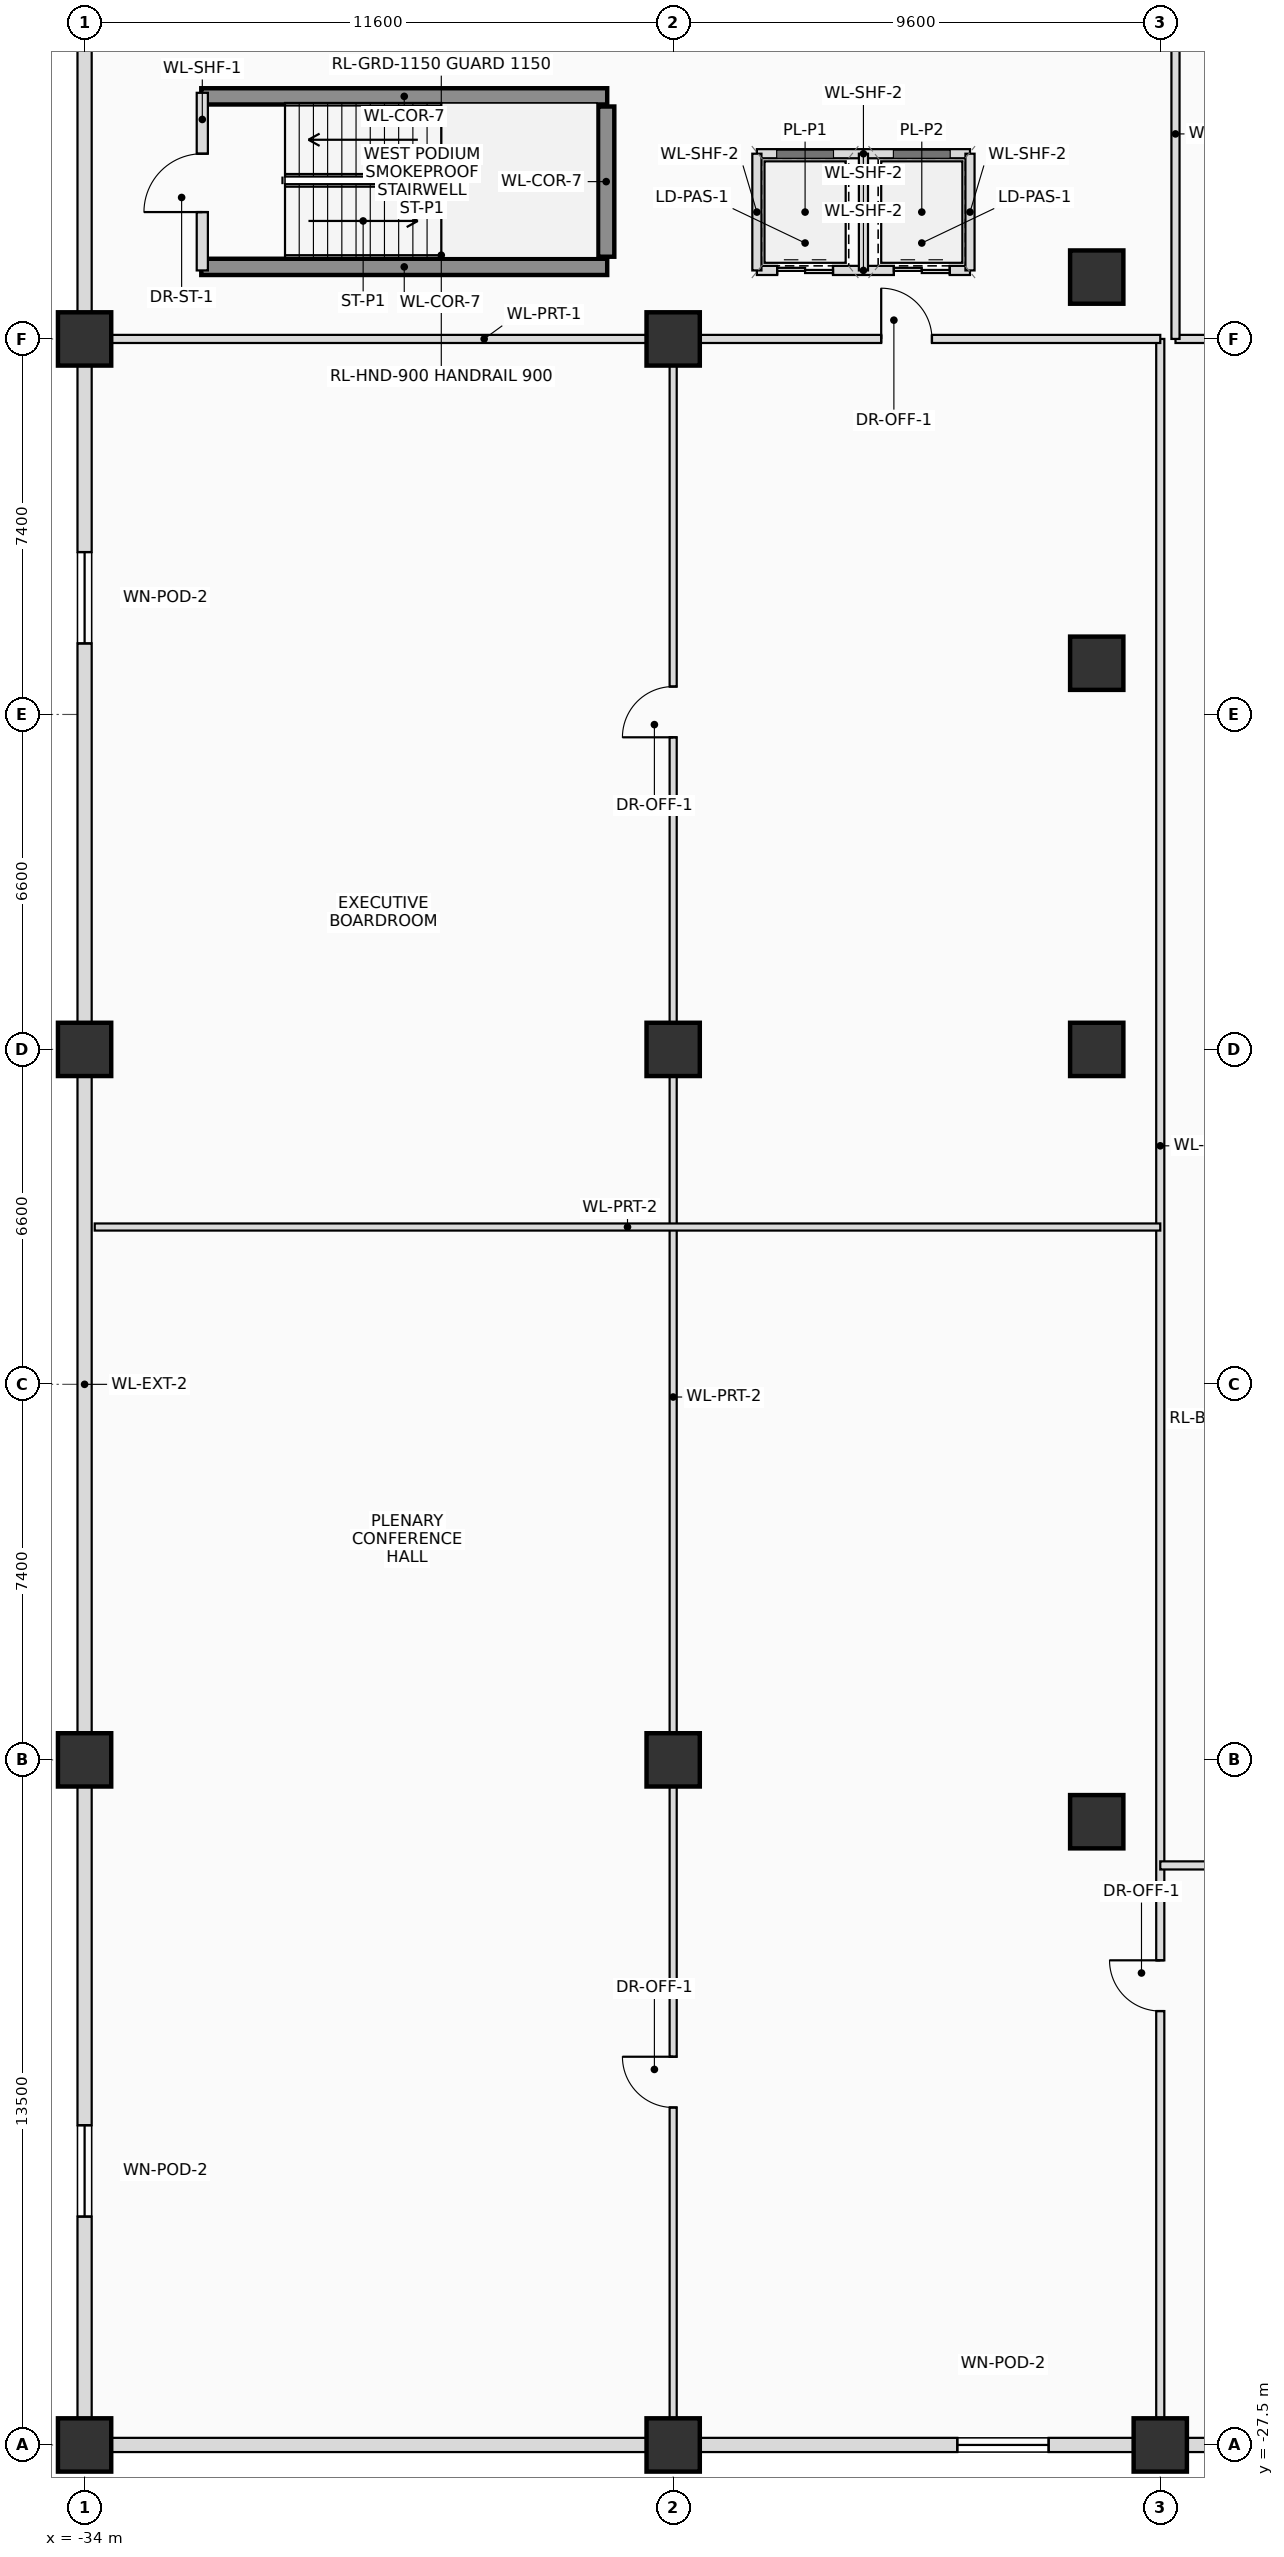
"""IFC4 building model, lengths in metres.
Left out: names, types, materials, properties, quantities, classifications, styles, units other than length and angle.
Written with IfcOpenShell. Run it as: python <this file> out.ifc"""

import sys

from ifc_helpers import new_model, si_unit, direction, frame, frame_2d, origin, origin_2d, place, context, subcontext, project, spatial, rectangle, extrude, source, transform, mapped, element, fill, save


model = new_model("IFC4")
c1 = context("Model", 3, precision=1e-05, world=origin(), true_north=direction((0.0, 1.0)))
c2 = subcontext(c1, "Body", "Model", "MODEL_VIEW")
j1 = project(units=[si_unit("LENGTHUNIT", "METRE"), si_unit("PLANEANGLEUNIT", "RADIAN")], contexts=[c1])
p1 = place(None, origin())
s1 = spatial("IfcSite", under=j1, at=p1, CompositionType="ELEMENT")
p2 = place(p1, origin())
s2 = spatial("IfcBuilding", under=s1, at=p2, CompositionType="ELEMENT")
p3 = place(p2, frame((0.0, 0.0, 12.3)))
s3 = spatial("IfcBuildingStorey", under=s2, at=p3, CompositionType="ELEMENT", Elevation=12.3)
for number, where, z_axis, x_axis in (
    (1, (-31.7, 18.78, 0.0), (0.0, 0.0, 1.0), (1.0, 0.0, 0.0)),
    (2, (-31.7, 15.42, 0.0), (0.0, 0.0, 1.0), (1.0, 0.0, 0.0)),
):
    element("IfcWall", number, at=place(p3, frame(where, z_axis=z_axis, x_axis=x_axis)), inside=s3, PredefinedType="SHEAR", context=c2, shape_type="SweptSolid", body=[
        extrude(rectangle(XDim=8.0, YDim=0.32, at=frame_2d((4.0, 0.0))), origin(), (0.0, 0.0, 1.0), 3.9),
    ])
p4 = place(p3, frame((-23.72, 15.62, 0.0), z_axis=(0.0, 0.0, 1.0), x_axis=(0.0, 1.0, 0.0)))
e3 = element("IfcWall", 3, at=p4, inside=s3, PredefinedType="SHEAR", context=c2, shape_type="SweptSolid", body=[
    extrude(rectangle(XDim=2.96, YDim=0.32, at=frame_2d((1.48, 0.0))), origin(), (0.0, 0.0, 1.0), 3.9),
])
m1 = source(origin(), c2, "Body", "SweptSolid", [
    extrude(rectangle(XDim=1.05, YDim=1.05, at=origin_2d()), origin(), (0.0, 0.0, 1.0), 3.9),
])
for number, where, z_axis, x_axis in (
    (4, (-34.0, -27.5, 0.0), (0.0, 0.0, 1.0), (1.0, 0.0, 0.0)),
    (5, (-22.4, -27.5, 0.0), (0.0, 0.0, 1.0), (1.0, 0.0, 0.0)),
    (6, (-12.8, -27.5, 0.0), (0.0, 0.0, 1.0), (1.0, 0.0, 0.0)),
    (7, (-34.0, -14.0, 0.0), (0.0, 0.0, 1.0), (1.0, 0.0, 0.0)),
    (8, (-22.4, -14.0, 0.0), (0.0, 0.0, 1.0), (1.0, 0.0, 0.0)),
    (9, (-34.0, 0.0, 0.0), (0.0, 0.0, 1.0), (1.0, 0.0, 0.0)),
    (10, (-22.4, 0.0, 0.0), (0.0, 0.0, 1.0), (1.0, 0.0, 0.0)),
    (11, (-34.0, 14.0, 0.0), (0.0, 0.0, 1.0), (1.0, 0.0, 0.0)),
    (12, (-22.4, 14.0, 0.0), (0.0, 0.0, 1.0), (1.0, 0.0, 0.0)),
    (13, (-14.052, 15.219, 0.0), (0.0, 0.0, 1.0), (1.0, 0.0, 0.0)),
    (14, (-14.052, 7.61, 0.0), (0.0, 0.0, 1.0), (1.0, 0.0, 0.0)),
    (15, (-14.052, 0.0, 0.0), (0.0, 0.0, 1.0), (1.0, 0.0, 0.0)),
    (16, (-14.052, -15.219, 0.0), (0.0, 0.0, 1.0), (1.0, 0.0, 0.0)),
):
    element("IfcColumn", number, at=place(p3, frame(where, z_axis=z_axis, x_axis=x_axis)), inside=s3, PredefinedType="COLUMN", context=c2, shape_type="MappedRepresentation", body=[
        mapped(m1, transform((0.0, 0.0, 0.0), scale=1.0)),
    ])
p5 = place(p3, frame((34.0, -27.5, 0.0), z_axis=(0.0, 0.0, 1.0), x_axis=(-1.0, 0.0, 0.0)))
e17 = element("IfcWall", 17, at=p5, inside=s3, PredefinedType="SOLIDWALL", context=c2, shape_type="SweptSolid", body=[
    extrude(rectangle(XDim=68.0, YDim=0.28, at=frame_2d((34.0, 0.0))), origin(), (0.0, 0.0, 1.0), 2.65),
])
p6 = place(p5, frame((16.0, 0.0, 0.65)))
e18 = element("IfcOpeningElement", 18, at=p6, cuts=e17, PredefinedType="OPENING", context=c2, shape_type="SweptSolid", body=[
    extrude(rectangle(XDim=1.8, YDim=1.8, at=frame_2d((0.9, 0.9))), frame((0.0, 0.15, 0.0), z_axis=(0.0, -1.0, 0.0), x_axis=(1.0, 0.0, 0.0)), (0.0, 0.0, 1.0), 0.3),
])
p7 = place(p5, frame((49.0, 0.0, 0.65)))
e19 = element("IfcOpeningElement", 19, at=p7, cuts=e17, PredefinedType="OPENING", context=c2, shape_type="SweptSolid", body=[
    extrude(rectangle(XDim=1.8, YDim=1.8, at=frame_2d((0.9, 0.9))), frame((0.0, 0.15, 0.0), z_axis=(0.0, -1.0, 0.0), x_axis=(1.0, 0.0, 0.0)), (0.0, 0.0, 1.0), 0.3),
])
p8 = place(p3, frame((-34.0, -27.5, 0.0), z_axis=(0.0, 0.0, 1.0), x_axis=(0.0, 1.0, 0.0)))
e20 = element("IfcWall", 20, at=p8, inside=s3, PredefinedType="SOLIDWALL", context=c2, shape_type="SweptSolid", body=[
    extrude(rectangle(XDim=57.0, YDim=0.28, at=frame_2d((28.5, 0.0))), origin(), (0.0, 0.0, 1.0), 2.65),
])
p9 = place(p8, frame((4.5, 0.0, 0.65)))
e21 = element("IfcOpeningElement", 21, at=p9, cuts=e20, PredefinedType="OPENING", context=c2, shape_type="SweptSolid", body=[
    extrude(rectangle(XDim=1.8, YDim=1.8, at=frame_2d((0.9, 0.9))), frame((0.0, 0.15, 0.0), z_axis=(0.0, -1.0, 0.0), x_axis=(1.0, 0.0, 0.0)), (0.0, 0.0, 1.0), 0.3),
])
p10 = place(p8, frame((35.5, 0.0, 0.65)))
e22 = element("IfcOpeningElement", 22, at=p10, cuts=e20, PredefinedType="OPENING", context=c2, shape_type="SweptSolid", body=[
    extrude(rectangle(XDim=1.8, YDim=1.8, at=frame_2d((0.9, 0.9))), frame((0.0, 0.15, 0.0), z_axis=(0.0, -1.0, 0.0), x_axis=(1.0, 0.0, 0.0)), (0.0, 0.0, 1.0), 0.3),
])
p11 = place(p3, frame((-31.68, 15.35, 0.0), z_axis=(0.0, 0.0, 1.0), x_axis=(0.0, 1.0, 0.0)))
e23 = element("IfcWall", 23, at=p11, inside=s3, PredefinedType="PLUMBINGWALL", context=c2, shape_type="SweptSolid", body=[
    extrude(rectangle(XDim=3.5, YDim=0.22, at=frame_2d((1.75, 0.0))), origin(), (0.0, 0.0, 1.0), 3.3),
])
p12 = place(p11, frame((1.15, 0.0, 0.0)))
e24 = element("IfcOpeningElement", 24, at=p12, cuts=e23, PredefinedType="OPENING", context=c2, shape_type="SweptSolid", body=[
    extrude(rectangle(XDim=1.15, YDim=2.15, at=frame_2d((0.575, 1.075))), frame((0.0, 0.12, 0.0), z_axis=(0.0, -1.0, 0.0), x_axis=(1.0, 0.0, 0.0)), (0.0, 0.0, 1.0), 0.24),
])
p13 = place(p3, frame((-20.75, 15.35, 0.0), z_axis=(0.0, 0.0, 1.0), x_axis=(1.0, 0.0, 0.0)))
e25 = element("IfcWall", 25, at=p13, inside=s3, PredefinedType="PLUMBINGWALL", context=c2, shape_type="SweptSolid", body=[
    extrude(rectangle(XDim=4.2, YDim=0.18, at=frame_2d((2.1, 0.0))), origin(), (0.0, 0.0, 1.0), 3.57),
])
p14 = place(p13, frame((0.4, 0.0, 0.0)))
e26 = element("IfcOpeningElement", 26, at=p14, cuts=e25, PredefinedType="OPENING", context=c2, shape_type="SweptSolid", body=[
    extrude(rectangle(XDim=1.1, YDim=2.2, at=frame_2d((0.55, 1.1))), frame((0.0, 0.1, 0.0), z_axis=(0.0, -1.0, 0.0), x_axis=(1.0, 0.0, 0.0)), (0.0, 0.0, 1.0), 0.2),
])
p15 = place(p13, frame((2.7, 0.0, 0.0)))
e27 = element("IfcOpeningElement", 27, at=p15, cuts=e25, PredefinedType="OPENING", context=c2, shape_type="SweptSolid", body=[
    extrude(rectangle(XDim=1.1, YDim=2.2, at=frame_2d((0.55, 1.1))), frame((0.0, 0.1, 0.0), z_axis=(0.0, -1.0, 0.0), x_axis=(1.0, 0.0, 0.0)), (0.0, 0.0, 1.0), 0.2),
])
p16 = place(p3, frame((-20.75, 17.65, 0.0), z_axis=(0.0, 0.0, 1.0), x_axis=(1.0, 0.0, 0.0)))
e28 = element("IfcWall", 28, at=p16, inside=s3, PredefinedType="PLUMBINGWALL", context=c2, shape_type="SweptSolid", body=[
    extrude(rectangle(XDim=4.2, YDim=0.18, at=frame_2d((2.1, 0.0))), origin(), (0.0, 0.0, 1.0), 3.57),
])
for number, where, z_axis, x_axis in (
    (29, (-20.75, 15.35, 0.0), (0.0, 0.0, 1.0), (0.0, 1.0, 0.0)),
    (30, (-18.65, 15.35, 0.0), (0.0, 0.0, 1.0), (0.0, 1.0, 0.0)),
    (31, (-16.55, 15.35, 0.0), (0.0, 0.0, 1.0), (0.0, 1.0, 0.0)),
):
    element("IfcWall", number, at=place(p3, frame(where, z_axis=z_axis, x_axis=x_axis)), inside=s3, PredefinedType="PLUMBINGWALL", context=c2, shape_type="SweptSolid", body=[
        extrude(rectangle(XDim=2.3, YDim=0.18, at=frame_2d((1.15, 0.0))), origin(), (0.0, 0.0, 1.0), 3.57),
    ])
p17 = place(p3, frame((-22.4, -27.35, 0.0), z_axis=(0.0, 0.0, 1.0), x_axis=(0.0, 1.0, 0.0)))
e32 = element("IfcWall", 32, at=p17, inside=s3, PredefinedType="PARTITIONING", context=c2, shape_type="SweptSolid", body=[
    extrude(rectangle(XDim=41.35, YDim=0.14, at=frame_2d((20.675, 0.0))), origin(), (0.0, 0.0, 1.0), 2.775),
])
p18 = place(p17, frame((6.5, 0.0, 0.0)))
e33 = element("IfcOpeningElement", 33, at=p18, cuts=e32, PredefinedType="OPENING", context=c2, shape_type="SweptSolid", body=[
    extrude(rectangle(XDim=1.0, YDim=2.25, at=frame_2d((0.5, 1.125))), frame((0.0, 0.08, 0.0), z_axis=(0.0, -1.0, 0.0), x_axis=(1.0, 0.0, 0.0)), (0.0, 0.0, 1.0), 0.16),
])
p19 = place(p17, frame((33.5, 0.0, 0.0)))
e34 = element("IfcOpeningElement", 34, at=p19, cuts=e32, PredefinedType="OPENING", context=c2, shape_type="SweptSolid", body=[
    extrude(rectangle(XDim=1.0, YDim=2.25, at=frame_2d((0.5, 1.125))), frame((0.0, 0.08, 0.0), z_axis=(0.0, -1.0, 0.0), x_axis=(1.0, 0.0, 0.0)), (0.0, 0.0, 1.0), 0.16),
])
p20 = place(p3, frame((-12.8, -27.35, 0.0), z_axis=(0.0, 0.0, 1.0), x_axis=(0.0, 1.0, 0.0)))
e35 = element("IfcWall", 35, at=p20, inside=s3, PredefinedType="PARTITIONING", context=c2, shape_type="SweptSolid", body=[
    extrude(rectangle(XDim=41.35, YDim=0.16, at=frame_2d((20.675, 0.0))), origin(), (0.0, 0.0, 1.0), 2.775),
])
p21 = place(p20, frame((8.4, 0.0, 0.0)))
e36 = element("IfcOpeningElement", 36, at=p21, cuts=e35, PredefinedType="OPENING", context=c2, shape_type="SweptSolid", body=[
    extrude(rectangle(XDim=1.0, YDim=2.25, at=frame_2d((0.5, 1.125))), frame((0.0, 0.09, 0.0), z_axis=(0.0, -1.0, 0.0), x_axis=(1.0, 0.0, 0.0)), (0.0, 0.0, 1.0), 0.18),
])
p22 = place(p3, frame((-33.8, 14.0, 0.0), z_axis=(0.0, 0.0, 1.0), x_axis=(1.0, 0.0, 0.0)))
e37 = element("IfcWall", 37, at=p22, inside=s3, PredefinedType="PARTITIONING", context=c2, shape_type="SweptSolid", body=[
    extrude(rectangle(XDim=21.0, YDim=0.16, at=frame_2d((10.5, 0.0))), origin(), (0.0, 0.0, 1.0), 2.775),
])
p23 = place(p22, frame((15.5, 0.0, 0.0)))
e38 = element("IfcOpeningElement", 38, at=p23, cuts=e37, PredefinedType="OPENING", context=c2, shape_type="SweptSolid", body=[
    extrude(rectangle(XDim=1.0, YDim=2.25, at=frame_2d((0.5, 1.125))), frame((0.0, 0.09, 0.0), z_axis=(0.0, -1.0, 0.0), x_axis=(1.0, 0.0, 0.0)), (0.0, 0.0, 1.0), 0.18),
])
p24 = place(p3, frame((-33.8, -3.5, 0.0), z_axis=(0.0, 0.0, 1.0), x_axis=(1.0, 0.0, 0.0)))
e39 = element("IfcWall", 39, at=p24, inside=s3, PredefinedType="PARTITIONING", context=c2, shape_type="SweptSolid", body=[
    extrude(rectangle(XDim=21.0, YDim=0.14, at=frame_2d((10.5, 0.0))), origin(), (0.0, 0.0, 1.0), 2.775),
])
p25 = place(p3, frame((-12.8, -16.08, 0.0), z_axis=(0.0, 0.0, 1.0), x_axis=(1.0, 0.0, 0.0)))
e40 = element("IfcWall", 40, at=p25, inside=s3, PredefinedType="PARTITIONING", context=c2, shape_type="SweptSolid", body=[
    extrude(rectangle(XDim=25.6, YDim=0.16, at=frame_2d((12.8, 0.0))), origin(), (0.0, 0.0, 1.0), 3.025),
])
p26 = place(p25, frame((4.2, 0.0, 0.0)))
e41 = element("IfcOpeningElement", 41, at=p26, cuts=e40, PredefinedType="OPENING", context=c2, shape_type="SweptSolid", body=[
    extrude(rectangle(XDim=1.0, YDim=2.25, at=frame_2d((0.5, 1.125))), frame((0.0, 0.09, 0.0), z_axis=(0.0, -1.0, 0.0), x_axis=(1.0, 0.0, 0.0)), (0.0, 0.0, 1.0), 0.18),
])
p27 = place(p25, frame((20.2, 0.0, 0.0)))
e42 = element("IfcOpeningElement", 42, at=p27, cuts=e40, PredefinedType="OPENING", context=c2, shape_type="SweptSolid", body=[
    extrude(rectangle(XDim=1.0, YDim=2.25, at=frame_2d((0.5, 1.125))), frame((0.0, 0.09, 0.0), z_axis=(0.0, -1.0, 0.0), x_axis=(1.0, 0.0, 0.0)), (0.0, 0.0, 1.0), 0.18),
])
p28 = place(p3, frame((-12.5, 14.0, 0.0), z_axis=(0.0, 0.0, 1.0), x_axis=(1.0, 0.0, 0.0)))
e43 = element("IfcWall", 43, at=p28, inside=s3, PredefinedType="PARTITIONING", context=c2, shape_type="SweptSolid", body=[
    extrude(rectangle(XDim=12.1, YDim=0.16, at=frame_2d((6.05, 0.0))), origin(), (0.0, 0.0, 1.0), 3.57),
])
p29 = place(p28, frame((5.5, 0.0, 0.0)))
e44 = element("IfcOpeningElement", 44, at=p29, cuts=e43, PredefinedType="OPENING", context=c2, shape_type="SweptSolid", body=[
    extrude(rectangle(XDim=1.0, YDim=2.25, at=frame_2d((0.5, 1.125))), frame((0.0, 0.09, 0.0), z_axis=(0.0, -1.0, 0.0), x_axis=(1.0, 0.0, 0.0)), (0.0, 0.0, 1.0), 0.18),
])
p30 = place(p3, frame((-12.5, 14.0, 0.0), z_axis=(0.0, 0.0, 1.0), x_axis=(0.0, 1.0, 0.0)))
e45 = element("IfcWall", 45, at=p30, inside=s3, PredefinedType="PARTITIONING", context=c2, shape_type="SweptSolid", body=[
    extrude(rectangle(XDim=8.08, YDim=0.16, at=frame_2d((4.04, 0.0))), origin(), (0.0, 0.0, 1.0), 3.57),
])
p31 = place(p7, origin())
e46 = element("IfcWindow", 46, at=p31, inside=s3, PartitioningType="SINGLE_PANEL", PredefinedType="WINDOW", context=c2, shape_type="SweptSolid", body=[
    extrude(rectangle(XDim=1.8, YDim=1.8, at=frame_2d((0.9, 0.9))), frame((0.0, 0.03, 0.0), z_axis=(0.0, -1.0, 0.0), x_axis=(1.0, 0.0, 0.0)), (0.0, 0.0, 1.0), 0.06),
])
fill(e19, e46)
p32 = place(p9, origin())
e47 = element("IfcWindow", 47, at=p32, inside=s3, PartitioningType="SINGLE_PANEL", PredefinedType="WINDOW", context=c2, shape_type="SweptSolid", body=[
    extrude(rectangle(XDim=1.8, YDim=1.8, at=frame_2d((0.9, 0.9))), frame((0.0, 0.03, 0.0), z_axis=(0.0, -1.0, 0.0), x_axis=(1.0, 0.0, 0.0)), (0.0, 0.0, 1.0), 0.06),
])
fill(e21, e47)
p33 = place(p10, origin())
e48 = element("IfcWindow", 48, at=p33, inside=s3, PartitioningType="SINGLE_PANEL", PredefinedType="WINDOW", context=c2, shape_type="SweptSolid", body=[
    extrude(rectangle(XDim=1.8, YDim=1.8, at=frame_2d((0.9, 0.9))), frame((0.0, 0.03, 0.0), z_axis=(0.0, -1.0, 0.0), x_axis=(1.0, 0.0, 0.0)), (0.0, 0.0, 1.0), 0.06),
])
fill(e22, e48)
p34 = place(p12, origin())
e49 = element("IfcDoor", 49, at=p34, inside=s3, OperationType="SINGLE_SWING_LEFT", PredefinedType="DOOR", context=c2, shape_type="SweptSolid", body=[
    extrude(rectangle(XDim=1.15, YDim=2.15, at=frame_2d((0.575, 1.075))), frame((0.0, 0.025, 0.0), z_axis=(0.0, -1.0, 0.0), x_axis=(1.0, 0.0, 0.0)), (0.0, 0.0, 1.0), 0.05),
])
fill(e24, e49)
p35 = place(p14, origin())
e50 = element("IfcDoor", 50, at=p35, inside=s3, OperationType="DOUBLE_DOOR_SLIDING", PredefinedType="DOOR", context=c2, shape_type="SweptSolid", body=[
    extrude(rectangle(XDim=1.1, YDim=2.2, at=frame_2d((0.55, 1.1))), frame((0.0, 0.025, 0.0), z_axis=(0.0, -1.0, 0.0), x_axis=(1.0, 0.0, 0.0)), (0.0, 0.0, 1.0), 0.05),
])
fill(e26, e50)
p36 = place(p15, origin())
e51 = element("IfcDoor", 51, at=p36, inside=s3, OperationType="DOUBLE_DOOR_SLIDING", PredefinedType="DOOR", context=c2, shape_type="SweptSolid", body=[
    extrude(rectangle(XDim=1.1, YDim=2.2, at=frame_2d((0.55, 1.1))), frame((0.0, 0.025, 0.0), z_axis=(0.0, -1.0, 0.0), x_axis=(1.0, 0.0, 0.0)), (0.0, 0.0, 1.0), 0.05),
])
fill(e27, e51)
p37 = place(p18, origin())
e52 = element("IfcDoor", 52, at=p37, inside=s3, OperationType="SINGLE_SWING_RIGHT", PredefinedType="DOOR", context=c2, shape_type="SweptSolid", body=[
    extrude(rectangle(XDim=1.0, YDim=2.25, at=frame_2d((0.5, 1.125))), frame((0.0, 0.025, 0.0), z_axis=(0.0, -1.0, 0.0), x_axis=(1.0, 0.0, 0.0)), (0.0, 0.0, 1.0), 0.05),
])
fill(e33, e52)
p38 = place(p19, origin())
e53 = element("IfcDoor", 53, at=p38, inside=s3, OperationType="SINGLE_SWING_LEFT", PredefinedType="DOOR", context=c2, shape_type="SweptSolid", body=[
    extrude(rectangle(XDim=1.0, YDim=2.25, at=frame_2d((0.5, 1.125))), frame((0.0, 0.025, 0.0), z_axis=(0.0, -1.0, 0.0), x_axis=(1.0, 0.0, 0.0)), (0.0, 0.0, 1.0), 0.05),
])
fill(e34, e53)
p39 = place(p21, origin())
e54 = element("IfcDoor", 54, at=p39, inside=s3, OperationType="SINGLE_SWING_RIGHT", PredefinedType="DOOR", context=c2, shape_type="SweptSolid", body=[
    extrude(rectangle(XDim=1.0, YDim=2.25, at=frame_2d((0.5, 1.125))), frame((0.0, 0.025, 0.0), z_axis=(0.0, -1.0, 0.0), x_axis=(1.0, 0.0, 0.0)), (0.0, 0.0, 1.0), 0.05),
])
fill(e36, e54)
p40 = place(p23, origin())
e55 = element("IfcDoor", 55, at=p40, inside=s3, OperationType="SINGLE_SWING_LEFT", PredefinedType="DOOR", context=c2, shape_type="SweptSolid", body=[
    extrude(rectangle(XDim=1.0, YDim=2.25, at=frame_2d((0.5, 1.125))), frame((0.0, 0.025, 0.0), z_axis=(0.0, -1.0, 0.0), x_axis=(1.0, 0.0, 0.0)), (0.0, 0.0, 1.0), 0.05),
])
fill(e38, e55)
save(model, sys.argv[1])
